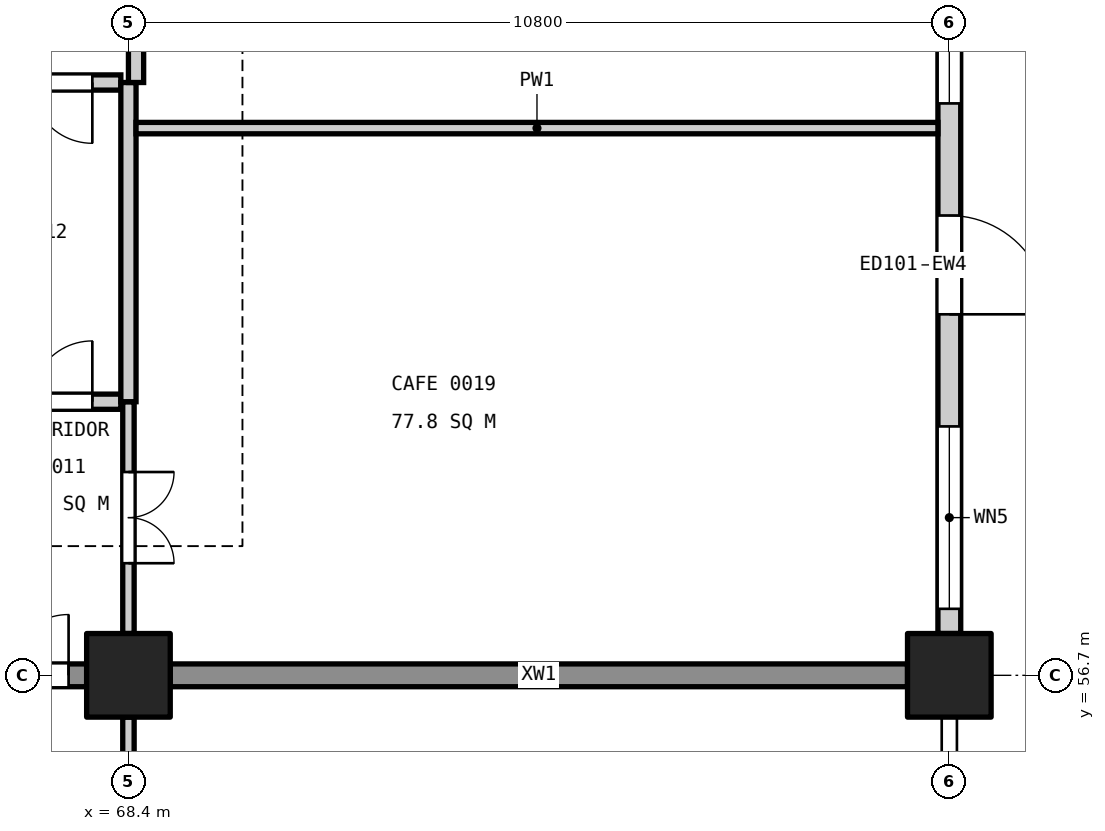
"""IFC4 building model, lengths in metres.
Left out: names, types, materials, properties, quantities, classifications, styles, units other than length and angle.
Written with IfcOpenShell. Run it as: python <this file> out.ifc"""

import sys

from ifc_helpers import new_model, si_unit, direction, frame, frame_2d, origin, origin_2d, place, context, subcontext, project, spatial, rectangle, extrude, element, fill, save


model = new_model("IFC4")
c1 = context("Model", 3, precision=1e-05, world=origin(), true_north=direction((0.0, 1.0)))
c2 = subcontext(c1, "Body", "Model", "MODEL_VIEW")
j1 = project(units=[si_unit("LENGTHUNIT", "METRE"), si_unit("PLANEANGLEUNIT", "RADIAN")], contexts=[c1])
p1 = place(None, origin())
s1 = spatial("IfcSite", under=j1, at=p1, CompositionType="ELEMENT")
p2 = place(p1, origin())
s2 = spatial("IfcBuilding", under=s1, at=p2, CompositionType="ELEMENT")
p3 = place(p2, origin())
s3 = spatial("IfcBuildingStorey", under=s2, at=p3, CompositionType="ELEMENT", Elevation=0.0)
for number, where, z_axis, x_axis in (
    (1, (68.4, 56.7, 0.0), (0.0, 0.0, 1.0), (1.0, 0.0, 0.0)),
    (2, (79.2, 56.7, 0.0), (0.0, 0.0, 1.0), (1.0, 0.0, 0.0)),
):
    element("IfcColumn", number, at=place(p3, frame(where, z_axis=z_axis, x_axis=x_axis)), inside=s3, PredefinedType="COLUMN", context=c2, shape_type="SweptSolid", body=[
        extrude(rectangle(XDim=1.1, YDim=1.1, at=origin_2d()), origin(), (0.0, 0.0, 1.0), 6.0),
    ])
p4 = place(p3, frame((61.75, 56.7, 0.0), z_axis=(0.0, 0.0, 1.0), x_axis=(1.0, 0.0, 0.0)))
e3 = element("IfcWall", 3, at=p4, inside=s3, PredefinedType="SHEAR", context=c2, shape_type="SweptSolid", body=[
    extrude(rectangle(XDim=6.1, YDim=0.3, at=frame_2d((3.05, 0.0))), origin(), (0.0, 0.0, 1.0), 5.7),
])
p5 = place(p4, frame((4.262, 0.0, 0.0)))
e4 = element("IfcOpeningElement", 4, at=p5, cuts=e3, PredefinedType="OPENING", context=c2, shape_type="SweptSolid", body=[
    extrude(rectangle(XDim=1.6, YDim=2.1, at=frame_2d((0.8, 1.05))), frame((0.0, 0.16, 0.0), z_axis=(0.0, -1.0, 0.0), x_axis=(1.0, 0.0, 0.0)), (0.0, 0.0, 1.0), 0.32),
])
p6 = place(p3, frame((68.95, 56.7, 0.0), z_axis=(0.0, 0.0, 1.0), x_axis=(1.0, 0.0, 0.0)))
e5 = element("IfcWall", 5, at=p6, inside=s3, PredefinedType="SHEAR", context=c2, shape_type="SweptSolid", body=[
    extrude(rectangle(XDim=9.7, YDim=0.3, at=frame_2d((4.85, 0.0))), origin(), (0.0, 0.0, 1.0), 5.7),
])
p7 = place(p3, frame((79.2, 57.25, 0.0), z_axis=(0.0, 0.0, 1.0), x_axis=(0.0, 1.0, 0.0)))
e6 = element("IfcWall", 6, at=p7, inside=s3, PredefinedType="STANDARD", context=c2, shape_type="SweptSolid", body=[
    extrude(rectangle(XDim=9.7, YDim=0.3, at=frame_2d((4.85, 0.0))), origin(), (0.0, 0.0, 1.0), 4.6),
])
p8 = place(p7, frame((0.325, 0.0, 0.9)))
e7 = element("IfcOpeningElement", 7, at=p8, cuts=e6, PredefinedType="OPENING", context=c2, shape_type="SweptSolid", body=[
    extrude(rectangle(XDim=2.4, YDim=3.0, at=frame_2d((1.2, 1.5))), frame((0.0, 0.16, 0.0), z_axis=(0.0, -1.0, 0.0), x_axis=(1.0, 0.0, 0.0)), (0.0, 0.0, 1.0), 0.32),
])
p9 = place(p7, frame((6.975, 0.0, 0.9)))
e8 = element("IfcOpeningElement", 8, at=p9, cuts=e6, PredefinedType="OPENING", context=c2, shape_type="SweptSolid", body=[
    extrude(rectangle(XDim=2.4, YDim=3.0, at=frame_2d((1.2, 1.5))), frame((0.0, 0.16, 0.0), z_axis=(0.0, -1.0, 0.0), x_axis=(1.0, 0.0, 0.0)), (0.0, 0.0, 1.0), 0.32),
])
p10 = place(p7, frame((4.2, 0.0, 0.0)))
e9 = element("IfcOpeningElement", 9, at=p10, cuts=e6, PredefinedType="OPENING", context=c2, shape_type="SweptSolid", body=[
    extrude(rectangle(XDim=1.3, YDim=2.4, at=frame_2d((0.65, 1.2))), frame((0.0, 0.16, 0.0), z_axis=(0.0, -1.0, 0.0), x_axis=(1.0, 0.0, 0.0)), (0.0, 0.0, 1.0), 0.32),
])
p11 = place(p3, frame((65.95, 60.3, 0.0), z_axis=(0.0, 0.0, 1.0), x_axis=(1.0, 0.0, 0.0)))
e10 = element("IfcWall", 10, at=p11, inside=s3, PredefinedType="PARTITIONING", context=c2, shape_type="SweptSolid", body=[
    extrude(rectangle(XDim=2.35, YDim=0.2, at=frame_2d((1.175, 0.0))), origin(), (0.0, 0.0, 1.0), 4.9),
])
p12 = place(p11, frame((0.375, 0.0, 0.0)))
e11 = element("IfcOpeningElement", 11, at=p12, cuts=e10, PredefinedType="OPENING", context=c2, shape_type="SweptSolid", body=[
    extrude(rectangle(XDim=1.6, YDim=2.1, at=frame_2d((0.8, 1.05))), frame((0.0, 0.11, 0.0), z_axis=(0.0, -1.0, 0.0), x_axis=(1.0, 0.0, 0.0)), (0.0, 0.0, 1.0), 0.22),
])
p13 = place(p3, frame((65.95, 64.5, 0.0), z_axis=(0.0, 0.0, 1.0), x_axis=(1.0, 0.0, 0.0)))
e12 = element("IfcWall", 12, at=p13, inside=s3, PredefinedType="PARTITIONING", context=c2, shape_type="SweptSolid", body=[
    extrude(rectangle(XDim=2.35, YDim=0.2, at=frame_2d((1.175, 0.0))), origin(), (0.0, 0.0, 1.0), 4.6),
])
p14 = place(p13, frame((0.375, 0.0, 0.0)))
e13 = element("IfcOpeningElement", 13, at=p14, cuts=e12, PredefinedType="OPENING", context=c2, shape_type="SweptSolid", body=[
    extrude(rectangle(XDim=1.6, YDim=2.1, at=frame_2d((0.8, 1.05))), frame((0.0, 0.11, 0.0), z_axis=(0.0, -1.0, 0.0), x_axis=(1.0, 0.0, 0.0)), (0.0, 0.0, 1.0), 0.22),
])
p15 = place(p3, frame((68.4, 46.45, 0.0), z_axis=(0.0, 0.0, 1.0), x_axis=(0.0, 1.0, 0.0)))
e14 = element("IfcWall", 14, at=p15, inside=s3, PredefinedType="PARTITIONING", context=c2, shape_type="SweptSolid", body=[
    extrude(rectangle(XDim=9.7, YDim=0.15, at=frame_2d((4.85, 0.0))), origin(), (0.0, 0.0, 1.0), 4.6),
])
p16 = place(p15, frame((4.25, 0.0, 0.0)))
e15 = element("IfcOpeningElement", 15, at=p16, cuts=e14, PredefinedType="OPENING", context=c2, shape_type="SweptSolid", body=[
    extrude(rectangle(XDim=1.2, YDim=2.1, at=frame_2d((0.6, 1.05))), frame((0.0, 0.085, 0.0), z_axis=(0.0, -1.0, 0.0), x_axis=(1.0, 0.0, 0.0)), (0.0, 0.0, 1.0), 0.17),
])
p17 = place(p3, frame((68.4, 57.25, 0.0), z_axis=(0.0, 0.0, 1.0), x_axis=(0.0, 1.0, 0.0)))
e16 = element("IfcWall", 16, at=p17, inside=s3, PredefinedType="PARTITIONING", context=c2, shape_type="SweptSolid", body=[
    extrude(rectangle(XDim=3.05, YDim=0.15, at=frame_2d((1.525, 0.0))), origin(), (0.0, 0.0, 1.0), 4.6),
])
p18 = place(p17, frame((0.925, 0.0, 0.0)))
e17 = element("IfcOpeningElement", 17, at=p18, cuts=e16, PredefinedType="OPENING", context=c2, shape_type="SweptSolid", body=[
    extrude(rectangle(XDim=1.2, YDim=2.1, at=frame_2d((0.6, 1.05))), frame((0.0, 0.085, 0.0), z_axis=(0.0, -1.0, 0.0), x_axis=(1.0, 0.0, 0.0)), (0.0, 0.0, 1.0), 0.17),
])
p19 = place(p3, frame((68.4, 60.3, 0.0), z_axis=(0.0, 0.0, 1.0), x_axis=(0.0, 1.0, 0.0)))
e18 = element("IfcWall", 18, at=p19, inside=s3, PredefinedType="PARTITIONING", context=c2, shape_type="SweptSolid", body=[
    extrude(rectangle(XDim=4.2, YDim=0.2, at=frame_2d((2.1, 0.0))), origin(), (0.0, 0.0, 1.0), 4.6),
])
p20 = place(p3, frame((68.5, 64.5, 0.0), z_axis=(0.0, 0.0, 1.0), x_axis=(0.0, 1.0, 0.0)))
e19 = element("IfcWall", 19, at=p20, inside=s3, PredefinedType="PARTITIONING", context=c2, shape_type="SweptSolid", body=[
    extrude(rectangle(XDim=2.45, YDim=0.2, at=frame_2d((1.225, 0.0))), origin(), (0.0, 0.0, 1.0), 4.6),
])
p21 = place(p3, frame((68.5, 63.9, 0.0), z_axis=(0.0, 0.0, 1.0), x_axis=(1.0, 0.0, 0.0)))
e20 = element("IfcWall", 20, at=p21, inside=s3, PredefinedType="PARTITIONING", context=c2, shape_type="SweptSolid", body=[
    extrude(rectangle(XDim=10.55, YDim=0.15, at=frame_2d((5.275, 0.0))), origin(), (0.0, 0.0, 1.0), 4.9),
])
p22 = place(p8, origin())
e21 = element("IfcWindow", 21, at=p22, inside=s3, PartitioningType="SINGLE_PANEL", PredefinedType="WINDOW", context=c2, shape_type="SweptSolid", body=[
    extrude(rectangle(XDim=2.4, YDim=3.0, at=frame_2d((1.2, 1.5))), frame((0.0, 0.03, 0.0), z_axis=(0.0, -1.0, 0.0), x_axis=(1.0, 0.0, 0.0)), (0.0, 0.0, 1.0), 0.06),
])
fill(e7, e21)
p23 = place(p9, origin())
e22 = element("IfcWindow", 22, at=p23, inside=s3, PartitioningType="SINGLE_PANEL", PredefinedType="WINDOW", context=c2, shape_type="SweptSolid", body=[
    extrude(rectangle(XDim=2.4, YDim=3.0, at=frame_2d((1.2, 1.5))), frame((0.0, 0.03, 0.0), z_axis=(0.0, -1.0, 0.0), x_axis=(1.0, 0.0, 0.0)), (0.0, 0.0, 1.0), 0.06),
])
fill(e8, e22)
p24 = place(p10, frame((1.3, 0.0, 0.0), z_axis=(0.0, 0.0, 1.0), x_axis=(-1.0, 0.0, 0.0)))
e23 = element("IfcDoor", 23, at=p24, inside=s3, OperationType="SINGLE_SWING_RIGHT", PredefinedType="DOOR", context=c2, shape_type="SweptSolid", body=[
    extrude(rectangle(XDim=1.3, YDim=2.4, at=frame_2d((0.65, 1.2))), frame((0.0, 0.025, 0.0), z_axis=(0.0, -1.0, 0.0), x_axis=(1.0, 0.0, 0.0)), (0.0, 0.0, 1.0), 0.05),
])
fill(e9, e23)
p25 = place(p18, frame((1.2, 0.0, 0.0), z_axis=(0.0, 0.0, 1.0), x_axis=(-1.0, 0.0, 0.0)))
e24 = element("IfcDoor", 24, at=p25, inside=s3, OperationType="DOUBLE_DOOR_SINGLE_SWING", PredefinedType="DOOR", context=c2, shape_type="SweptSolid", body=[
    extrude(rectangle(XDim=1.2, YDim=2.1, at=frame_2d((0.6, 1.05))), frame((0.0, 0.025, 0.0), z_axis=(0.0, -1.0, 0.0), x_axis=(1.0, 0.0, 0.0)), (0.0, 0.0, 1.0), 0.05),
])
fill(e17, e24)
p26 = place(p12, origin())
e25 = element("IfcDoor", 25, at=p26, inside=s3, OperationType="DOUBLE_DOOR_SINGLE_SWING", PredefinedType="DOOR", context=c2, shape_type="SweptSolid", body=[
    extrude(rectangle(XDim=1.6, YDim=2.1, at=frame_2d((0.8, 1.05))), frame((0.0, 0.025, 0.0), z_axis=(0.0, -1.0, 0.0), x_axis=(1.0, 0.0, 0.0)), (0.0, 0.0, 1.0), 0.05),
])
fill(e11, e25)
p27 = place(p14, frame((1.6, 0.0, 0.0), z_axis=(0.0, 0.0, 1.0), x_axis=(-1.0, 0.0, 0.0)))
e26 = element("IfcDoor", 26, at=p27, inside=s3, OperationType="DOUBLE_DOOR_SINGLE_SWING", PredefinedType="DOOR", context=c2, shape_type="SweptSolid", body=[
    extrude(rectangle(XDim=1.6, YDim=2.1, at=frame_2d((0.8, 1.05))), frame((0.0, 0.025, 0.0), z_axis=(0.0, -1.0, 0.0), x_axis=(1.0, 0.0, 0.0)), (0.0, 0.0, 1.0), 0.05),
])
fill(e13, e26)
p28 = place(p5, origin())
e27 = element("IfcDoor", 27, at=p28, inside=s3, OperationType="DOUBLE_DOOR_SINGLE_SWING", PredefinedType="DOOR", context=c2, shape_type="SweptSolid", body=[
    extrude(rectangle(XDim=1.6, YDim=2.1, at=frame_2d((0.8, 1.05))), frame((0.0, 0.025, 0.0), z_axis=(0.0, -1.0, 0.0), x_axis=(1.0, 0.0, 0.0)), (0.0, 0.0, 1.0), 0.05),
])
fill(e4, e27)
save(model, sys.argv[1])
